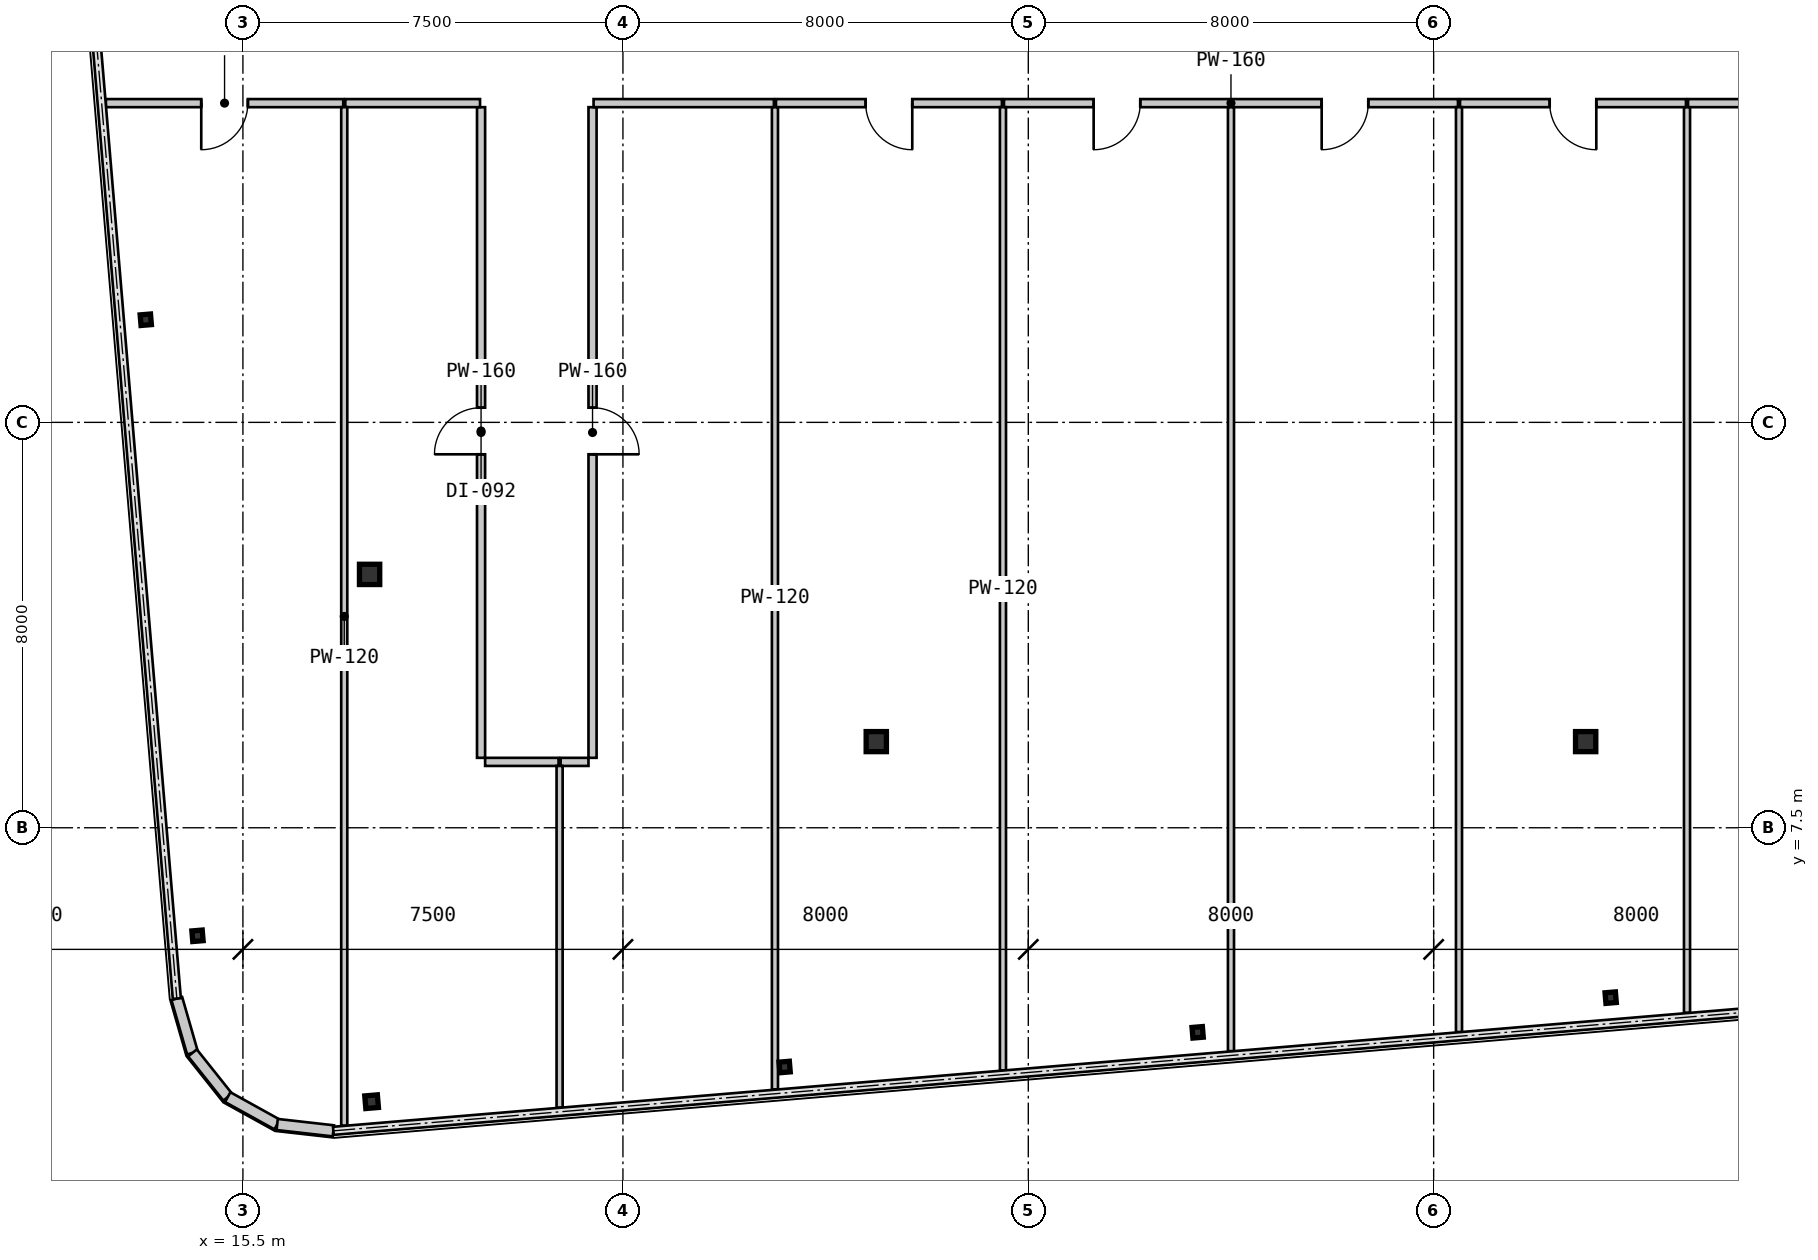
"""IFC4 building model, lengths in metres.
Left out: names, types, materials, properties, quantities, classifications, styles, units other than length and angle.
Written with IfcOpenShell. Run it as: python <this file> out.ifc"""

import sys

from ifc_helpers import new_model, si_unit, direction, frame, frame_2d, origin, origin_2d, place, context, subcontext, project, spatial, rectangle, hollow_rectangle, i_section, extrude, source, transform, mapped, element, fill, save


model = new_model("IFC4")
c1 = context("Model", 3, precision=1e-05, world=origin(), true_north=direction((0.0, 1.0)))
c2 = subcontext(c1, "Body", "Model", "MODEL_VIEW")
j1 = project(units=[si_unit("LENGTHUNIT", "METRE"), si_unit("PLANEANGLEUNIT", "RADIAN")], contexts=[c1])
p1 = place(None, origin())
s1 = spatial("IfcSite", under=j1, at=p1, CompositionType="ELEMENT")
p2 = place(p1, origin())
s2 = spatial("IfcBuilding", under=s1, at=p2, CompositionType="ELEMENT")
p3 = place(p2, frame((0.0, 0.0, 204.05)))
s3 = spatial("IfcBuildingStorey", under=s2, at=p3, CompositionType="ELEMENT", Elevation=204.05)
m1 = source(origin(), c2, "Body", "SweptSolid", [
    extrude(i_section(OverallWidth=0.4, OverallDepth=0.396, WebThickness=0.022, FlangeThickness=0.034, at=origin_2d()), origin(), (0.0, 0.0, 1.0), 3.15),
])
for number, where, z_axis, x_axis in (
    (1, (28.0, 9.2, 0.0), (0.0, 0.0, 1.0), (1.0, 0.0, 0.0)),
    (2, (42.0, 9.2, 0.0), (0.0, 0.0, 1.0), (1.0, 0.0, 0.0)),
):
    element("IfcColumn", number, at=place(p3, frame(where, z_axis=z_axis, x_axis=x_axis)), inside=s3, PredefinedType="COLUMN", context=c2, shape_type="MappedRepresentation", body=[
        mapped(m1, transform((0.0, 0.0, 0.0), scale=1.0)),
    ])
m2 = source(origin(), c2, "Body", "SweptSolid", [
    extrude(hollow_rectangle(XDim=0.4, YDim=0.4, WallThickness=0.016, at=origin_2d()), origin(), (0.0, 0.0, 1.0), 3.15),
])
p4 = place(p3, frame((18.0, 12.5, 0.0), z_axis=(0.0, 0.0, 1.0), x_axis=(1.0, 0.0, 0.0)))
e3 = element("IfcColumn", 3, at=p4, inside=s3, PredefinedType="COLUMN", context=c2, shape_type="MappedRepresentation", body=[
    mapped(m2, transform((0.0, 0.0, 0.0), scale=1.0)),
])
m3 = source(origin(), c2, "Body", "SweptSolid", [
    extrude(hollow_rectangle(XDim=0.25, YDim=0.25, WallThickness=0.01, at=origin_2d()), origin(), (0.0, 0.0, 1.0), 3.15),
])
p5 = place(p3, frame((18.04, 2.094, 0.0), z_axis=(0.0, 0.0, 1.0), x_axis=(0.99649285925, 0.083677843332, 0.0)))
e4 = element("IfcColumn", 4, at=p5, inside=s3, PredefinedType="COLUMN", context=c2, shape_type="MappedRepresentation", body=[
    mapped(m3, transform((0.0, 0.0, 0.0), scale=1.0)),
])
m4 = source(origin(), c2, "Body", "SweptSolid", [
    extrude(i_section(OverallWidth=0.205, OverallDepth=0.21, WebThickness=0.009, FlangeThickness=0.014, at=origin_2d()), origin(), (0.0, 0.0, 1.0), 3.15),
])
for number, where, z_axis, x_axis in (
    (5, (26.191, 2.779, 0.0), (0.0, 0.0, 1.0), (0.996, 0.084, 0.0)),
    (6, (34.342, 3.463, 0.0), (0.0, 0.0, 1.0), (0.996, 0.084, 0.0)),
    (7, (42.494, 4.147, 0.0), (0.0, 0.0, 1.0), (0.996, 0.084, 0.0)),
    (8, (14.604, 5.368, 0.0), (0.0, 0.0, 1.0), (0.996, 0.084, 0.0)),
    (9, (13.583, 17.525, 0.0), (0.0, 0.0, 1.0), (0.996, 0.084, 0.0)),
):
    element("IfcColumn", number, at=place(p3, frame(where, z_axis=z_axis, x_axis=x_axis)), inside=s3, PredefinedType="COLUMN", context=c2, shape_type="MappedRepresentation", body=[
        mapped(m4, transform((0.0, 0.0, 0.0), scale=1.0)),
    ])
m5 = source(origin(), c2, "Body", "SweptSolid", [
    extrude(rectangle(XDim=1.116, YDim=0.22, at=frame_2d((0.558, 0.0))), origin(), (0.0, 0.0, 1.0), 2.87),
])
for number, where, z_axis, x_axis in (
    (10, (14.196, 4.13, 0.0), (0.0, 0.0, 1.0), (0.277, -0.961, 0.0)),
    (11, (14.504, 3.057, 0.0), (0.0, 0.0, 1.0), (0.623, -0.782, 0.0)),
    (12, (15.2, 2.184, 0.0), (0.0, 0.0, 1.0), (0.875, -0.484, 0.0)),
    (13, (16.176, 1.644, 0.0), (0.0, 0.0, 1.0), (0.994, -0.112, 0.0)),
):
    element("IfcWall", number, at=place(p3, frame(where, z_axis=z_axis, x_axis=x_axis)), inside=s3, PredefinedType="SOLIDWALL", context=c2, shape_type="MappedRepresentation", body=[
        mapped(m5, transform((0.0, 0.0, 0.0), scale=1.0)),
    ])
m6 = source(origin(), c2, "Body", "SweptSolid", [
    extrude(rectangle(XDim=4.684, YDim=0.16, at=frame_2d((2.342, 0.0))), origin(), (0.0, 0.0, 1.0), 2.87),
])
p6 = place(p3, frame((17.48, 21.8, 0.0), z_axis=(0.0, 0.0, 1.0), x_axis=(-1.0, 0.0, 0.0)))
e14 = element("IfcWall", 14, at=p6, inside=s3, PredefinedType="PARTITIONING", context=c2, shape_type="MappedRepresentation", body=[
    mapped(m6, transform((0.0, 0.0, 0.0), scale=1.0)),
])
m7 = source(origin(), c2, "Body", "SweptSolid", [
    extrude(rectangle(XDim=0.92, YDim=2.1, at=frame_2d((0.46, 1.05))), frame((0.0, 0.09, 0.0), z_axis=(0.0, -1.0, 0.0), x_axis=(1.0, 0.0, 0.0)), (0.0, 0.0, 1.0), 0.18),
])
p7 = place(p6, frame((1.882, 0.0, 0.0)))
e15 = element("IfcOpeningElement", 15, at=p7, cuts=e14, PredefinedType="OPENING", context=c2, shape_type="MappedRepresentation", body=[
    mapped(m7, transform((0.0, 0.0, 0.0), scale=1.0)),
])
m8 = source(origin(), c2, "Body", "SweptSolid", [
    extrude(rectangle(XDim=12.84, YDim=0.16, at=frame_2d((6.42, 0.0))), origin(), (0.0, 0.0, 1.0), 2.87),
])
p8 = place(p3, frame((20.2, 8.88, 0.0), z_axis=(0.0, 0.0, 1.0), x_axis=(0.0, 1.0, 0.0)))
e16 = element("IfcWall", 16, at=p8, inside=s3, PredefinedType="PARTITIONING", context=c2, shape_type="MappedRepresentation", body=[
    mapped(m8, transform((0.0, 0.0, 0.0), scale=1.0)),
])
p9 = place(p8, frame((5.99, 0.0, 0.0)))
e17 = element("IfcOpeningElement", 17, at=p9, cuts=e16, PredefinedType="OPENING", context=c2, shape_type="MappedRepresentation", body=[
    mapped(m7, transform((0.0, 0.0, 0.0), scale=1.0)),
])
m9 = source(origin(), c2, "Body", "SweptSolid", [
    extrude(rectangle(XDim=2.659, YDim=0.16, at=frame_2d((1.33, 0.0))), origin(), (0.0, 0.0, 1.0), 2.87),
])
p10 = place(p3, frame((20.18, 21.8, 0.0), z_axis=(0.0, 0.0, 1.0), x_axis=(-1.0, 0.0, 0.0)))
e18 = element("IfcWall", 18, at=p10, inside=s3, PredefinedType="PARTITIONING", context=c2, shape_type="MappedRepresentation", body=[
    mapped(m9, transform((0.0, 0.0, 0.0), scale=1.0)),
])
m10 = source(origin(), c2, "Body", "SweptSolid", [
    extrude(rectangle(XDim=1.45, YDim=0.16, at=frame_2d((0.725, 0.0))), origin(), (0.0, 0.0, 1.0), 2.87),
])
p11 = place(p3, frame((21.73, 8.8, 0.0), z_axis=(0.0, 0.0, 1.0), x_axis=(-1.0, 0.0, 0.0)))
e19 = element("IfcWall", 19, at=p11, inside=s3, PredefinedType="PARTITIONING", context=c2, shape_type="MappedRepresentation", body=[
    mapped(m10, transform((0.0, 0.0, 0.0), scale=1.0)),
])
p12 = place(p3, frame((22.4, 21.72, 0.0), z_axis=(0.0, 0.0, 1.0), x_axis=(0.0, -1.0, 0.0)))
e20 = element("IfcWall", 20, at=p12, inside=s3, PredefinedType="PARTITIONING", context=c2, shape_type="MappedRepresentation", body=[
    mapped(m8, transform((0.0, 0.0, 0.0), scale=1.0)),
])
p13 = place(p12, frame((5.93, 0.0, 0.0)))
e21 = element("IfcOpeningElement", 21, at=p13, cuts=e20, PredefinedType="OPENING", context=c2, shape_type="MappedRepresentation", body=[
    mapped(m7, transform((0.0, 0.0, 0.0), scale=1.0)),
])
m11 = source(origin(), c2, "Body", "SweptSolid", [
    extrude(rectangle(XDim=3.559, YDim=0.16, at=frame_2d((1.78, 0.0))), origin(), (0.0, 0.0, 1.0), 2.87),
])
p14 = place(p3, frame((25.98, 21.8, 0.0), z_axis=(0.0, 0.0, 1.0), x_axis=(-1.0, 0.0, 0.0)))
e22 = element("IfcWall", 22, at=p14, inside=s3, PredefinedType="PARTITIONING", context=c2, shape_type="MappedRepresentation", body=[
    mapped(m11, transform((0.0, 0.0, 0.0), scale=1.0)),
])
m12 = source(origin(), c2, "Body", "SweptSolid", [
    extrude(rectangle(XDim=0.55, YDim=0.16, at=frame_2d((0.275, 0.0))), origin(), (0.0, 0.0, 1.0), 2.87),
])
p15 = place(p3, frame((22.32, 8.8, 0.0), z_axis=(0.0, 0.0, 1.0), x_axis=(-1.0, 0.0, 0.0)))
e23 = element("IfcWall", 23, at=p15, inside=s3, PredefinedType="PARTITIONING", context=c2, shape_type="MappedRepresentation", body=[
    mapped(m12, transform((0.0, 0.0, 0.0), scale=1.0)),
])
m13 = source(origin(), c2, "Body", "SweptSolid", [
    extrude(rectangle(XDim=4.459, YDim=0.16, at=frame_2d((2.23, 0.0))), origin(), (0.0, 0.0, 1.0), 2.87),
])
p16 = place(p3, frame((30.48, 21.8, 0.0), z_axis=(0.0, 0.0, 1.0), x_axis=(-1.0, 0.0, 0.0)))
e24 = element("IfcWall", 24, at=p16, inside=s3, PredefinedType="PARTITIONING", context=c2, shape_type="MappedRepresentation", body=[
    mapped(m13, transform((0.0, 0.0, 0.0), scale=1.0)),
])
p17 = place(p16, frame((1.77, 0.0, 0.0)))
e25 = element("IfcOpeningElement", 25, at=p17, cuts=e24, PredefinedType="OPENING", context=c2, shape_type="MappedRepresentation", body=[
    mapped(m7, transform((0.0, 0.0, 0.0), scale=1.0)),
])
p18 = place(p3, frame((34.98, 21.8, 0.0), z_axis=(0.0, 0.0, 1.0), x_axis=(-1.0, 0.0, 0.0)))
e26 = element("IfcWall", 26, at=p18, inside=s3, PredefinedType="PARTITIONING", context=c2, shape_type="MappedRepresentation", body=[
    mapped(m13, transform((0.0, 0.0, 0.0), scale=1.0)),
])
p19 = place(p18, frame((1.77, 0.0, 0.0)))
e27 = element("IfcOpeningElement", 27, at=p19, cuts=e26, PredefinedType="OPENING", context=c2, shape_type="MappedRepresentation", body=[
    mapped(m7, transform((0.0, 0.0, 0.0), scale=1.0)),
])
p20 = place(p3, frame((39.48, 21.8, 0.0), z_axis=(0.0, 0.0, 1.0), x_axis=(-1.0, 0.0, 0.0)))
e28 = element("IfcWall", 28, at=p20, inside=s3, PredefinedType="PARTITIONING", context=c2, shape_type="MappedRepresentation", body=[
    mapped(m13, transform((0.0, 0.0, 0.0), scale=1.0)),
])
p21 = place(p20, frame((1.77, 0.0, 0.0)))
e29 = element("IfcOpeningElement", 29, at=p21, cuts=e28, PredefinedType="OPENING", context=c2, shape_type="MappedRepresentation", body=[
    mapped(m7, transform((0.0, 0.0, 0.0), scale=1.0)),
])
p22 = place(p3, frame((43.98, 21.8, 0.0), z_axis=(0.0, 0.0, 1.0), x_axis=(-1.0, 0.0, 0.0)))
e30 = element("IfcWall", 30, at=p22, inside=s3, PredefinedType="PARTITIONING", context=c2, shape_type="MappedRepresentation", body=[
    mapped(m13, transform((0.0, 0.0, 0.0), scale=1.0)),
])
p23 = place(p22, frame((1.77, 0.0, 0.0)))
e31 = element("IfcOpeningElement", 31, at=p23, cuts=e30, PredefinedType="OPENING", context=c2, shape_type="MappedRepresentation", body=[
    mapped(m7, transform((0.0, 0.0, 0.0), scale=1.0)),
])
p24 = place(p3, frame((47.58, 21.8, 0.0), z_axis=(0.0, 0.0, 1.0), x_axis=(-1.0, 0.0, 0.0)))
e32 = element("IfcWall", 32, at=p24, inside=s3, PredefinedType="PARTITIONING", context=c2, shape_type="MappedRepresentation", body=[
    mapped(m11, transform((0.0, 0.0, 0.0), scale=1.0)),
])
m14 = source(origin(), c2, "Body", "SweptSolid", [
    extrude(rectangle(XDim=20.099, YDim=0.12, at=frame_2d((10.05, 0.0))), origin(), (0.0, 0.0, 1.0), 2.87),
])
p25 = place(p3, frame((17.5, 21.72, 0.0), z_axis=(0.0, 0.0, 1.0), x_axis=(0.0, -1.0, 0.0)))
e33 = element("IfcWall", 33, at=p25, inside=s3, PredefinedType="PARTITIONING", context=c2, shape_type="MappedRepresentation", body=[
    mapped(m14, transform((0.0, 0.0, 0.0), scale=1.0)),
])
m15 = source(origin(), c2, "Body", "SweptSolid", [
    extrude(rectangle(XDim=6.743, YDim=0.12, at=frame_2d((3.371, 0.0))), origin(), (0.0, 0.0, 1.0), 2.87),
])
p26 = place(p3, frame((21.75, 8.72, 0.0), z_axis=(0.0, 0.0, 1.0), x_axis=(0.0, -1.0, 0.0)))
e34 = element("IfcWall", 34, at=p26, inside=s3, PredefinedType="PARTITIONING", context=c2, shape_type="MappedRepresentation", body=[
    mapped(m15, transform((0.0, 0.0, 0.0), scale=1.0)),
])
m16 = source(origin(), c2, "Body", "SweptSolid", [
    extrude(rectangle(XDim=19.382, YDim=0.12, at=frame_2d((9.691, 0.0))), origin(), (0.0, 0.0, 1.0), 2.87),
])
p27 = place(p3, frame((26.0, 21.718, 0.0), z_axis=(0.0, 0.0, 1.0), x_axis=(0.0, -1.0, 0.0)))
e35 = element("IfcWall", 35, at=p27, inside=s3, PredefinedType="PARTITIONING", context=c2, shape_type="MappedRepresentation", body=[
    mapped(m16, transform((0.0, 0.0, 0.0), scale=1.0)),
])
m17 = source(origin(), c2, "Body", "SweptSolid", [
    extrude(rectangle(XDim=19.008, YDim=0.12, at=frame_2d((9.504, 0.0))), origin(), (0.0, 0.0, 1.0), 2.87),
])
p28 = place(p3, frame((30.5, 21.72, 0.0), z_axis=(0.0, 0.0, 1.0), x_axis=(0.0, -1.0, 0.0)))
e36 = element("IfcWall", 36, at=p28, inside=s3, PredefinedType="PARTITIONING", context=c2, shape_type="MappedRepresentation", body=[
    mapped(m17, transform((0.0, 0.0, 0.0), scale=1.0)),
])
m18 = source(origin(), c2, "Body", "SweptSolid", [
    extrude(rectangle(XDim=18.626, YDim=0.12, at=frame_2d((9.313, 0.0))), origin(), (0.0, 0.0, 1.0), 2.87),
])
p29 = place(p3, frame((35.0, 21.718, 0.0), z_axis=(0.0, 0.0, 1.0), x_axis=(0.0, -1.0, 0.0)))
e37 = element("IfcWall", 37, at=p29, inside=s3, PredefinedType="PARTITIONING", context=c2, shape_type="MappedRepresentation", body=[
    mapped(m18, transform((0.0, 0.0, 0.0), scale=1.0)),
])
m19 = source(origin(), c2, "Body", "SweptSolid", [
    extrude(rectangle(XDim=18.252, YDim=0.12, at=frame_2d((9.126, 0.0))), origin(), (0.0, 0.0, 1.0), 2.87),
])
p30 = place(p3, frame((39.5, 21.72, 0.0), z_axis=(0.0, 0.0, 1.0), x_axis=(0.0, -1.0, 0.0)))
e38 = element("IfcWall", 38, at=p30, inside=s3, PredefinedType="PARTITIONING", context=c2, shape_type="MappedRepresentation", body=[
    mapped(m19, transform((0.0, 0.0, 0.0), scale=1.0)),
])
m20 = source(origin(), c2, "Body", "SweptSolid", [
    extrude(rectangle(XDim=17.87, YDim=0.12, at=frame_2d((8.935, 0.0))), origin(), (0.0, 0.0, 1.0), 2.87),
])
p31 = place(p3, frame((44.0, 21.718, 0.0), z_axis=(0.0, 0.0, 1.0), x_axis=(0.0, -1.0, 0.0)))
e39 = element("IfcWall", 39, at=p31, inside=s3, PredefinedType="PARTITIONING", context=c2, shape_type="MappedRepresentation", body=[
    mapped(m20, transform((0.0, 0.0, 0.0), scale=1.0)),
])
m21 = source(origin(), c2, "Body", "SweptSolid", [
    extrude(rectangle(XDim=0.92, YDim=2.1, at=frame_2d((0.46, 1.05))), frame((0.0, 0.025, 0.0), z_axis=(0.0, -1.0, 0.0), x_axis=(1.0, 0.0, 0.0)), (0.0, 0.0, 1.0), 0.05),
])
p32 = place(p7, origin())
e40 = element("IfcDoor", 40, at=p32, inside=s3, OperationType="SINGLE_SWING_RIGHT", PredefinedType="DOOR", context=c2, shape_type="MappedRepresentation", body=[
    mapped(m21, transform((0.0, 0.0, 0.0), scale=1.0)),
])
fill(e15, e40)
p33 = place(p9, origin())
e41 = element("IfcDoor", 41, at=p33, inside=s3, OperationType="SINGLE_SWING_LEFT", PredefinedType="DOOR", context=c2, shape_type="MappedRepresentation", body=[
    mapped(m21, transform((0.0, 0.0, 0.0), scale=1.0)),
])
fill(e17, e41)
p34 = place(p13, origin())
e42 = element("IfcDoor", 42, at=p34, inside=s3, OperationType="SINGLE_SWING_RIGHT", PredefinedType="DOOR", context=c2, shape_type="MappedRepresentation", body=[
    mapped(m21, transform((0.0, 0.0, 0.0), scale=1.0)),
])
fill(e21, e42)
p35 = place(p17, origin())
e43 = element("IfcDoor", 43, at=p35, inside=s3, OperationType="SINGLE_SWING_LEFT", PredefinedType="DOOR", context=c2, shape_type="MappedRepresentation", body=[
    mapped(m21, transform((0.0, 0.0, 0.0), scale=1.0)),
])
fill(e25, e43)
p36 = place(p19, origin())
e44 = element("IfcDoor", 44, at=p36, inside=s3, OperationType="SINGLE_SWING_RIGHT", PredefinedType="DOOR", context=c2, shape_type="MappedRepresentation", body=[
    mapped(m21, transform((0.0, 0.0, 0.0), scale=1.0)),
])
fill(e27, e44)
p37 = place(p21, origin())
e45 = element("IfcDoor", 45, at=p37, inside=s3, OperationType="SINGLE_SWING_RIGHT", PredefinedType="DOOR", context=c2, shape_type="MappedRepresentation", body=[
    mapped(m21, transform((0.0, 0.0, 0.0), scale=1.0)),
])
fill(e29, e45)
p38 = place(p23, origin())
e46 = element("IfcDoor", 46, at=p38, inside=s3, OperationType="SINGLE_SWING_LEFT", PredefinedType="DOOR", context=c2, shape_type="MappedRepresentation", body=[
    mapped(m21, transform((0.0, 0.0, 0.0), scale=1.0)),
])
fill(e31, e46)
save(model, sys.argv[1])
